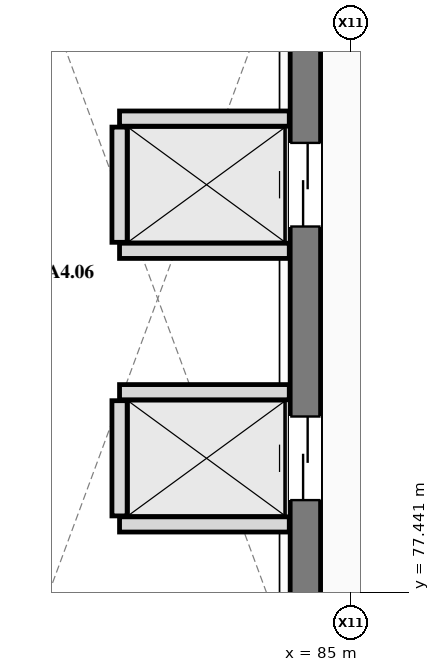
"""IFC4 building model, lengths in metres.
Left out: names, types, materials, properties, quantities, classifications, styles, units other than length and angle.
Written with IfcOpenShell. Run it as: python <this file> out.ifc"""

import sys

from ifc_helpers import new_model, si_unit, direction, frame, frame_2d, origin, place, context, subcontext, project, spatial, rectangle, extrude, element, fill, save


model = new_model("IFC4")
c1 = context("Model", 3, precision=1e-05, world=origin(), true_north=direction((0.0, 1.0)))
c2 = subcontext(c1, "Body", "Model", "MODEL_VIEW")
j1 = project(units=[si_unit("LENGTHUNIT", "METRE"), si_unit("PLANEANGLEUNIT", "RADIAN")], contexts=[c1])
p1 = place(None, origin())
s1 = spatial("IfcSite", under=j1, at=p1, CompositionType="ELEMENT")
p2 = place(p1, origin())
s2 = spatial("IfcBuilding", under=s1, at=p2, CompositionType="ELEMENT")
p3 = place(p2, frame((0.0, 0.0, 15.6)))
s3 = spatial("IfcBuildingStorey", under=s2, at=p3, CompositionType="ELEMENT", Elevation=15.6)
p4 = place(p3, frame((84.4, 76.6, 0.0), z_axis=(0.0, 0.0, 1.0), x_axis=(0.0, 1.0, 0.0)))
e1 = element("IfcWall", 1, at=p4, inside=s3, PredefinedType="SHEAR", context=c2, shape_type="SweptSolid", body=[
    extrude(rectangle(XDim=9.4, YDim=0.4, at=frame_2d((4.7, 0.0))), origin(), (0.0, 0.0, 1.0), 3.9),
])
p5 = place(p4, frame((2.05, 0.0, 0.0)))
e2 = element("IfcOpeningElement", 2, at=p5, cuts=e1, PredefinedType="OPENING", context=c2, shape_type="SweptSolid", body=[
    extrude(rectangle(XDim=1.1, YDim=2.2, at=frame_2d((0.55, 1.1))), frame((0.0, 0.21, 0.0), z_axis=(0.0, -1.0, 0.0), x_axis=(1.0, 0.0, 0.0)), (0.0, 0.0, 1.0), 0.42),
])
p6 = place(p4, frame((5.65, 0.0, 0.0)))
e3 = element("IfcOpeningElement", 3, at=p6, cuts=e1, PredefinedType="OPENING", context=c2, shape_type="SweptSolid", body=[
    extrude(rectangle(XDim=1.1, YDim=2.2, at=frame_2d((0.55, 1.1))), frame((0.0, 0.21, 0.0), z_axis=(0.0, -1.0, 0.0), x_axis=(1.0, 0.0, 0.0)), (0.0, 0.0, 1.0), 0.42),
])
for number, where, z_axis, x_axis in (
    (4, (81.955, 78.33, 0.0), (0.0, 0.0, 1.0), (1.0, 0.0, 0.0)),
    (5, (81.955, 80.07, 0.0), (0.0, 0.0, 1.0), (1.0, 0.0, 0.0)),
):
    element("IfcWall", number, at=place(p3, frame(where, z_axis=z_axis, x_axis=x_axis)), inside=s3, PredefinedType="PLUMBINGWALL", context=c2, shape_type="SweptSolid", body=[
        extrude(rectangle(XDim=2.233, YDim=0.2, at=frame_2d((1.116, 0.0))), origin(), (0.0, 0.0, 1.0), 3.6),
    ])
p7 = place(p3, frame((81.955, 78.442, 0.0), z_axis=(0.0, 0.0, 1.0), x_axis=(0.0, 1.0, 0.0)))
e6 = element("IfcWall", 6, at=p7, inside=s3, PredefinedType="PLUMBINGWALL", context=c2, shape_type="SweptSolid", body=[
    extrude(rectangle(XDim=1.516, YDim=0.2, at=frame_2d((0.758, 0.0))), origin(), (0.0, 0.0, 1.0), 3.6),
])
for number, where, z_axis, x_axis in (
    (7, (81.955, 81.93, 0.0), (0.0, 0.0, 1.0), (1.0, 0.0, 0.0)),
    (8, (81.955, 83.67, 0.0), (0.0, 0.0, 1.0), (1.0, 0.0, 0.0)),
):
    element("IfcWall", number, at=place(p3, frame(where, z_axis=z_axis, x_axis=x_axis)), inside=s3, PredefinedType="PLUMBINGWALL", context=c2, shape_type="SweptSolid", body=[
        extrude(rectangle(XDim=2.233, YDim=0.2, at=frame_2d((1.116, 0.0))), origin(), (0.0, 0.0, 1.0), 3.6),
    ])
p8 = place(p3, frame((81.955, 82.042, 0.0), z_axis=(0.0, 0.0, 1.0), x_axis=(0.0, 1.0, 0.0)))
e9 = element("IfcWall", 9, at=p8, inside=s3, PredefinedType="PLUMBINGWALL", context=c2, shape_type="SweptSolid", body=[
    extrude(rectangle(XDim=1.516, YDim=0.2, at=frame_2d((0.758, 0.0))), origin(), (0.0, 0.0, 1.0), 3.6),
])
p9 = place(p5, origin())
e10 = element("IfcDoor", 10, at=p9, inside=s3, OperationType="SLIDING_TO_LEFT", PredefinedType="DOOR", context=c2, shape_type="SweptSolid", body=[
    extrude(rectangle(XDim=1.1, YDim=2.2, at=frame_2d((0.55, 1.1))), frame((0.0, 0.025, 0.0), z_axis=(0.0, -1.0, 0.0), x_axis=(1.0, 0.0, 0.0)), (0.0, 0.0, 1.0), 0.05),
])
fill(e2, e10)
p10 = place(p6, origin())
e11 = element("IfcDoor", 11, at=p10, inside=s3, OperationType="SLIDING_TO_RIGHT", PredefinedType="DOOR", context=c2, shape_type="SweptSolid", body=[
    extrude(rectangle(XDim=1.1, YDim=2.2, at=frame_2d((0.55, 1.1))), frame((0.0, 0.025, 0.0), z_axis=(0.0, -1.0, 0.0), x_axis=(1.0, 0.0, 0.0)), (0.0, 0.0, 1.0), 0.05),
])
fill(e3, e11)
save(model, sys.argv[1])
